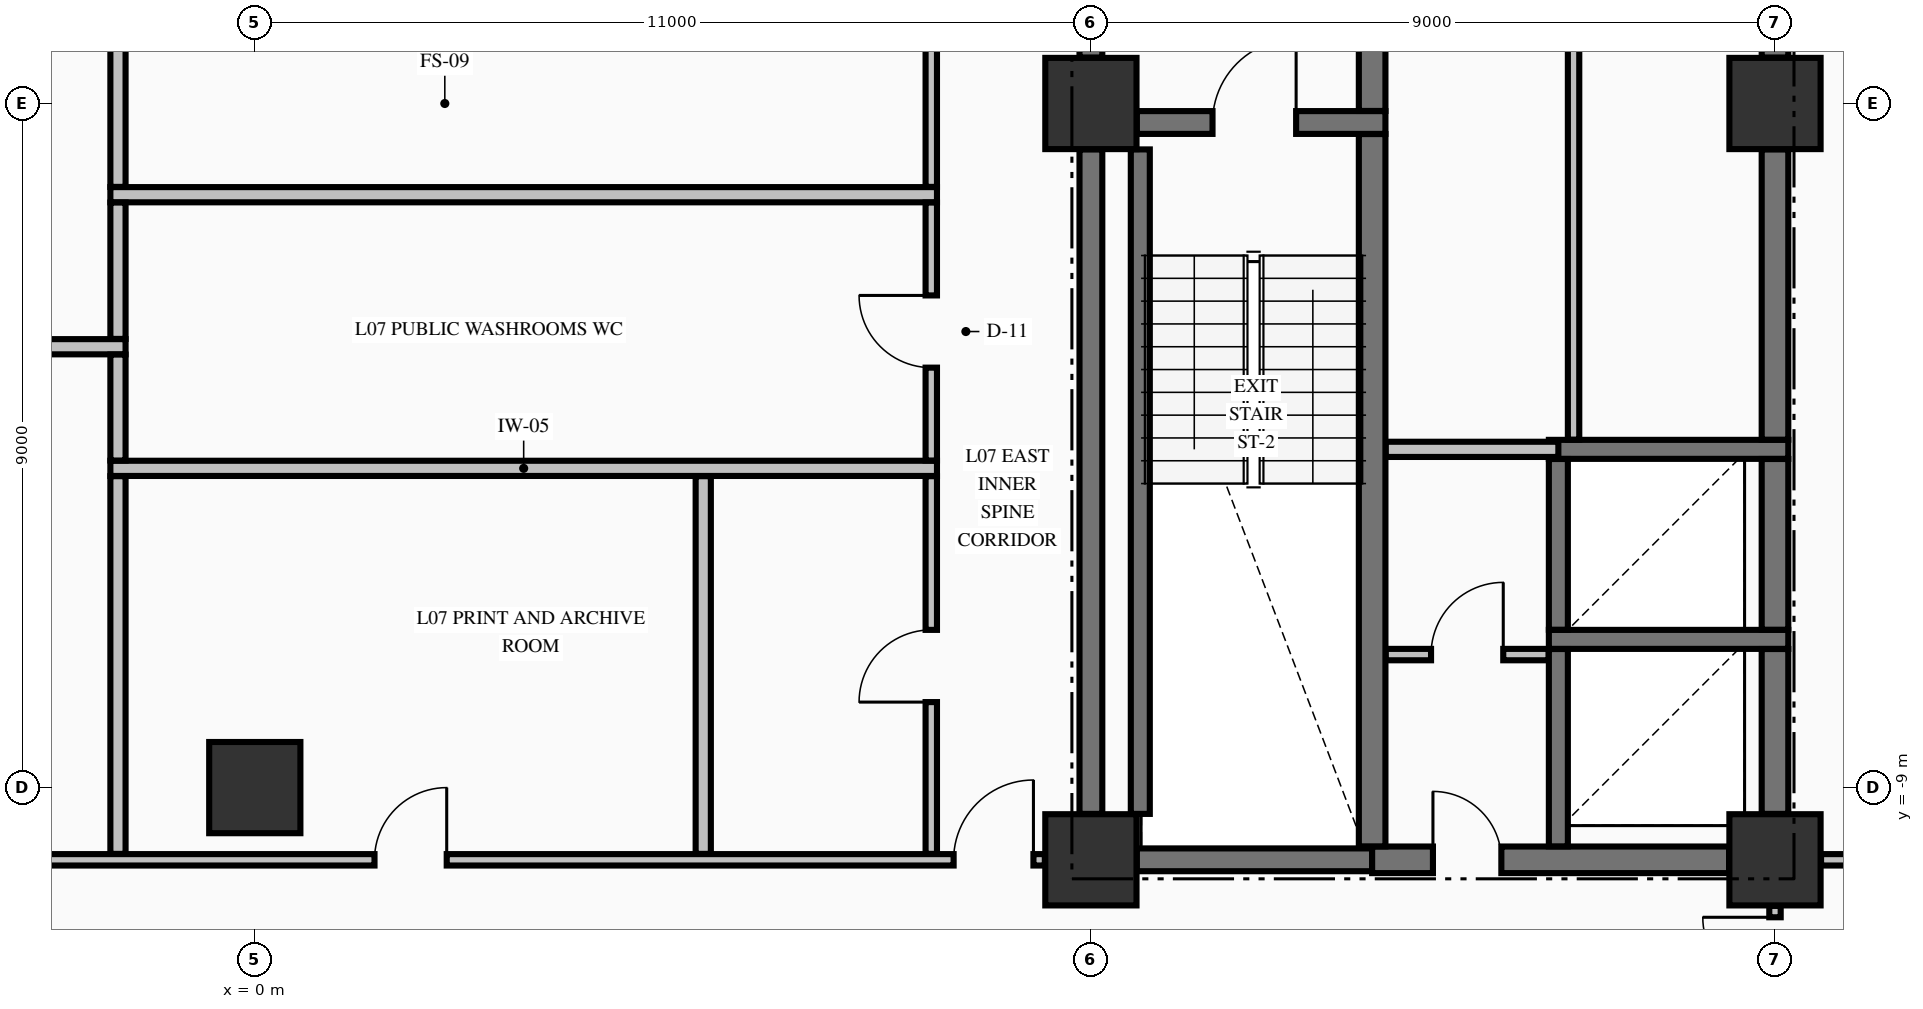
"""IFC4 building model, lengths in metres.
Left out: names, types, materials, properties, quantities, classifications, styles, units other than length and angle.
Written with IfcOpenShell. Run it as: python <this file> out.ifc"""

import sys

from ifc_helpers import new_model, si_unit, direction, frame, frame_2d, origin, origin_2d, place, context, subcontext, project, spatial, rectangle, extrude, element, fill, save


model = new_model("IFC4")
c1 = context("Model", 3, precision=1e-05, world=origin(), true_north=direction((0.0, 1.0)))
c2 = subcontext(c1, "Body", "Model", "MODEL_VIEW")
j1 = project(units=[si_unit("LENGTHUNIT", "METRE"), si_unit("PLANEANGLEUNIT", "RADIAN")], contexts=[c1])
p1 = place(None, origin())
s1 = spatial("IfcSite", under=j1, at=p1, CompositionType="ELEMENT")
p2 = place(p1, origin())
s2 = spatial("IfcBuilding", under=s1, at=p2, CompositionType="ELEMENT")
p3 = place(p2, frame((0.0, 0.0, 34.34)))
s3 = spatial("IfcBuildingStorey", under=s2, at=p3, CompositionType="ELEMENT", Elevation=34.34)
for number, where, z_axis, x_axis in (
    (1, (11.0, -9.95, -0.3), (0.0, 0.0, 1.0), (1.0, 0.0, 0.0)),
    (2, (11.0, 0.0, -0.3), (0.0, 0.0, 1.0), (1.0, 0.0, 0.0)),
    (3, (20.0, -9.95, -0.3), (0.0, 0.0, 1.0), (1.0, 0.0, 0.0)),
    (4, (0.0, -9.0, -0.3), (0.0, 0.0, 1.0), (1.0, 0.0, 0.0)),
    (5, (20.0, 0.0, -0.3), (0.0, 0.0, 1.0), (1.0, 0.0, 0.0)),
):
    element("IfcColumn", number, at=place(p3, frame(where, z_axis=z_axis, x_axis=x_axis)), inside=s3, PredefinedType="COLUMN", context=c2, shape_type="SweptSolid", body=[
        extrude(rectangle(XDim=1.2, YDim=1.2, at=origin_2d()), origin(), (0.0, 0.0, 1.0), 3.62),
    ])
p4 = place(p3, frame((11.604, -9.95, 0.0), z_axis=(0.0, 0.0, 1.0), x_axis=(1.0, 0.0, 0.0)))
e6 = element("IfcWall", 6, at=p4, inside=s3, PredefinedType="SHEAR", context=c2, shape_type="SweptSolid", body=[
    extrude(rectangle(XDim=3.096, YDim=0.3, at=frame_2d((1.548, 0.0))), origin(), (0.0, 0.0, 1.0), 3.32),
])
p5 = place(p3, frame((14.7, -9.95, 0.0), z_axis=(0.0, 0.0, 1.0), x_axis=(1.0, 0.0, 0.0)))
e7 = element("IfcWall", 7, at=p5, inside=s3, PredefinedType="SHEAR", context=c2, shape_type="SweptSolid", body=[
    extrude(rectangle(XDim=4.696, YDim=0.35, at=frame_2d((2.348, 0.0))), origin(), (0.0, 0.0, 1.0), 3.32),
])
p6 = place(p5, frame((0.8, 0.0, 0.0)))
e8 = element("IfcOpeningElement", 8, at=p6, cuts=e7, PredefinedType="OPENING", context=c2, shape_type="SweptSolid", body=[
    extrude(rectangle(XDim=0.9, YDim=2.15, at=frame_2d((0.45, 1.075))), frame((0.0, 0.185, 0.0), z_axis=(0.0, -1.0, 0.0), x_axis=(1.0, 0.0, 0.0)), (0.0, 0.0, 1.0), 0.37),
])
for number, where, z_axis, x_axis in (
    (9, (17.025, -7.05, 0.0), (0.0, 0.0, 1.0), (1.0, 0.0, 0.0)),
    (10, (17.025, -4.55, 0.0), (0.0, 0.0, 1.0), (1.0, 0.0, 0.0)),
):
    element("IfcWall", number, at=place(p3, frame(where, z_axis=z_axis, x_axis=x_axis)), inside=s3, PredefinedType="SOLIDWALL", context=c2, shape_type="SweptSolid", body=[
        extrude(rectangle(XDim=3.15, YDim=0.25, at=frame_2d((1.575, 0.0))), origin(), (0.0, 0.0, 1.0), 3.32),
    ])
p7 = place(p3, frame((11.604, -0.25, 0.0), z_axis=(0.0, 0.0, 1.0), x_axis=(1.0, 0.0, 0.0)))
e11 = element("IfcWall", 11, at=p7, inside=s3, PredefinedType="SHEAR", context=c2, shape_type="SweptSolid", body=[
    extrude(rectangle(XDim=3.271, YDim=0.3, at=frame_2d((1.635, 0.0))), origin(), (0.0, 0.0, 1.0), 3.32),
])
p8 = place(p7, frame((0.996, 0.0, 0.0)))
e12 = element("IfcOpeningElement", 12, at=p8, cuts=e11, PredefinedType="OPENING", context=c2, shape_type="SweptSolid", body=[
    extrude(rectangle(XDim=1.1, YDim=2.15, at=frame_2d((0.55, 1.075))), frame((0.0, 0.16, 0.0), z_axis=(0.0, -1.0, 0.0), x_axis=(1.0, 0.0, 0.0)), (0.0, 0.0, 1.0), 0.32),
])
p9 = place(p3, frame((-10.394, -9.95, 0.0), z_axis=(0.0, 0.0, 1.0), x_axis=(1.0, 0.0, 0.0)))
e13 = element("IfcWall", 13, at=p9, inside=s3, PredefinedType="PARTITIONING", context=c2, shape_type="SweptSolid", body=[
    extrude(rectangle(XDim=20.788, YDim=0.15, at=frame_2d((10.394, 0.0))), origin(), (0.0, 0.0, 1.0), 3.32),
])
p10 = place(p9, frame((0.15, 0.0, 0.0)))
e14 = element("IfcOpeningElement", 14, at=p10, cuts=e13, PredefinedType="OPENING", context=c2, shape_type="SweptSolid", body=[
    extrude(rectangle(XDim=1.05, YDim=2.15, at=frame_2d((0.525, 1.075))), frame((0.0, 0.085, 0.0), z_axis=(0.0, -1.0, 0.0), x_axis=(1.0, 0.0, 0.0)), (0.0, 0.0, 1.0), 0.17),
])
p11 = place(p9, frame((19.588, 0.0, 0.0)))
e15 = element("IfcOpeningElement", 15, at=p11, cuts=e13, PredefinedType="OPENING", context=c2, shape_type="SweptSolid", body=[
    extrude(rectangle(XDim=1.05, YDim=2.15, at=frame_2d((0.525, 1.075))), frame((0.0, 0.085, 0.0), z_axis=(0.0, -1.0, 0.0), x_axis=(1.0, 0.0, 0.0)), (0.0, 0.0, 1.0), 0.17),
])
p12 = place(p9, frame((11.969, 0.0, 0.0)))
e16 = element("IfcOpeningElement", 16, at=p12, cuts=e13, PredefinedType="OPENING", context=c2, shape_type="SweptSolid", body=[
    extrude(rectangle(XDim=0.95, YDim=2.15, at=frame_2d((0.475, 1.075))), frame((0.0, 0.085, 0.0), z_axis=(0.0, -1.0, 0.0), x_axis=(1.0, 0.0, 0.0)), (0.0, 0.0, 1.0), 0.17),
])
p13 = place(p3, frame((20.606, -9.95, 0.0), z_axis=(0.0, 0.0, 1.0), x_axis=(1.0, 0.0, 0.0)))
e17 = element("IfcWall", 17, at=p13, inside=s3, PredefinedType="PARTITIONING", context=c2, shape_type="SweptSolid", body=[
    extrude(rectangle(XDim=8.229, YDim=0.15, at=frame_2d((4.115, 0.0))), origin(), (0.0, 0.0, 1.0), 3.32),
])
p14 = place(p13, frame((3.394, 0.0, 0.0)))
e18 = element("IfcOpeningElement", 18, at=p14, cuts=e17, PredefinedType="OPENING", context=c2, shape_type="SweptSolid", body=[
    extrude(rectangle(XDim=1.0, YDim=2.15, at=frame_2d((0.5, 1.075))), frame((0.0, 0.085, 0.0), z_axis=(0.0, -1.0, 0.0), x_axis=(1.0, 0.0, 0.0)), (0.0, 0.0, 1.0), 0.17),
])
p15 = place(p3, frame((14.878, -7.25, 0.0), z_axis=(0.0, 0.0, 1.0), x_axis=(1.0, 0.0, 0.0)))
e19 = element("IfcWall", 19, at=p15, inside=s3, PredefinedType="PARTITIONING", context=c2, shape_type="SweptSolid", body=[
    extrude(rectangle(XDim=2.144, YDim=0.15, at=frame_2d((1.072, 0.0))), origin(), (0.0, 0.0, 1.0), 3.32),
])
p16 = place(p15, frame((0.597, 0.0, 0.0)))
e20 = element("IfcOpeningElement", 20, at=p16, cuts=e19, PredefinedType="OPENING", context=c2, shape_type="SweptSolid", body=[
    extrude(rectangle(XDim=0.95, YDim=2.15, at=frame_2d((0.475, 1.075))), frame((0.0, 0.085, 0.0), z_axis=(0.0, -1.0, 0.0), x_axis=(1.0, 0.0, 0.0)), (0.0, 0.0, 1.0), 0.17),
])
p17 = place(p3, frame((-1.9, -4.8, 0.0), z_axis=(0.0, 0.0, 1.0), x_axis=(1.0, 0.0, 0.0)))
e21 = element("IfcWall", 21, at=p17, inside=s3, PredefinedType="PARTITIONING", context=c2, shape_type="SweptSolid", body=[
    extrude(rectangle(XDim=10.875, YDim=0.2, at=frame_2d((5.438, 0.0))), origin(), (0.0, 0.0, 1.0), 3.32),
])
p18 = place(p3, frame((14.878, -4.55, 0.0), z_axis=(0.0, 0.0, 1.0), x_axis=(1.0, 0.0, 0.0)))
e22 = element("IfcWall", 22, at=p18, inside=s3, PredefinedType="PARTITIONING", context=c2, shape_type="SweptSolid", body=[
    extrude(rectangle(XDim=2.272, YDim=0.2, at=frame_2d((1.136, 0.0))), origin(), (0.0, 0.0, 1.0), 3.32),
])
p19 = place(p3, frame((-8.975, -3.2, 0.0), z_axis=(0.0, 0.0, 1.0), x_axis=(1.0, 0.0, 0.0)))
e23 = element("IfcWall", 23, at=p19, inside=s3, PredefinedType="PARTITIONING", context=c2, shape_type="SweptSolid", body=[
    extrude(rectangle(XDim=7.275, YDim=0.2, at=frame_2d((3.638, 0.0))), origin(), (0.0, 0.0, 1.0), 3.32),
])
p20 = place(p3, frame((-1.9, -1.2, 0.0), z_axis=(0.0, 0.0, 1.0), x_axis=(1.0, 0.0, 0.0)))
e24 = element("IfcWall", 24, at=p20, inside=s3, PredefinedType="PARTITIONING", context=c2, shape_type="SweptSolid", body=[
    extrude(rectangle(XDim=10.875, YDim=0.2, at=frame_2d((5.438, 0.0))), origin(), (0.0, 0.0, 1.0), 3.32),
])
p21 = place(p3, frame((11.0, -9.346, 0.0), z_axis=(0.0, 0.0, 1.0), x_axis=(0.0, 1.0, 0.0)))
e25 = element("IfcWall", 25, at=p21, inside=s3, PredefinedType="SHEAR", context=c2, shape_type="SweptSolid", body=[
    extrude(rectangle(XDim=8.742, YDim=0.3, at=frame_2d((4.371, 0.0))), origin(), (0.0, 0.0, 1.0), 3.32),
])
p22 = place(p3, frame((11.0, 0.604, 0.0), z_axis=(0.0, 0.0, 1.0), x_axis=(0.0, 1.0, 0.0)))
e26 = element("IfcWall", 26, at=p22, inside=s3, PredefinedType="SHEAR", context=c2, shape_type="SweptSolid", body=[
    extrude(rectangle(XDim=2.144, YDim=0.3, at=frame_2d((1.072, 0.0))), origin(), (0.0, 0.0, 1.0), 3.32),
])
p23 = place(p22, frame((0.496, 0.0, 0.0)))
e27 = element("IfcOpeningElement", 27, at=p23, cuts=e26, PredefinedType="OPENING", context=c2, shape_type="SweptSolid", body=[
    extrude(rectangle(XDim=1.1, YDim=2.15, at=frame_2d((0.55, 1.075))), frame((0.0, 0.16, 0.0), z_axis=(0.0, -1.0, 0.0), x_axis=(1.0, 0.0, 0.0)), (0.0, 0.0, 1.0), 0.32),
])
p24 = place(p3, frame((11.65, -9.346, 0.0), z_axis=(0.0, 0.0, 1.0), x_axis=(0.0, 1.0, 0.0)))
e28 = element("IfcWall", 28, at=p24, inside=s3, PredefinedType="SOLIDWALL", context=c2, shape_type="SweptSolid", body=[
    extrude(rectangle(XDim=8.742, YDim=0.25, at=frame_2d((4.371, 0.0))), origin(), (0.0, 0.0, 1.0), 3.32),
])
p25 = place(p3, frame((14.7, -9.773, 0.0), z_axis=(0.0, 0.0, 1.0), x_axis=(0.0, 1.0, 0.0)))
e29 = element("IfcWall", 29, at=p25, inside=s3, PredefinedType="SHEAR", context=c2, shape_type="SweptSolid", body=[
    extrude(rectangle(XDim=9.371, YDim=0.35, at=frame_2d((4.686, 0.0))), origin(), (0.0, 0.0, 1.0), 3.32),
])
p26 = place(p3, frame((14.7, -0.098, 0.0), z_axis=(0.0, 0.0, 1.0), x_axis=(0.0, 1.0, 0.0)))
e30 = element("IfcWall", 30, at=p26, inside=s3, PredefinedType="SHEAR", context=c2, shape_type="SweptSolid", body=[
    extrude(rectangle(XDim=2.846, YDim=0.35, at=frame_2d((1.423, 0.0))), origin(), (0.0, 0.0, 1.0), 3.32),
])
p27 = place(p3, frame((17.15, -9.773, 0.0), z_axis=(0.0, 0.0, 1.0), x_axis=(0.0, 1.0, 0.0)))
e31 = element("IfcWall", 31, at=p27, inside=s3, PredefinedType="SOLIDWALL", context=c2, shape_type="SweptSolid", body=[
    extrude(rectangle(XDim=2.596, YDim=0.25, at=frame_2d((1.298, 0.0))), origin(), (0.0, 0.0, 1.0), 3.32),
])
p28 = place(p3, frame((17.15, -6.923, 0.0), z_axis=(0.0, 0.0, 1.0), x_axis=(0.0, 1.0, 0.0)))
e32 = element("IfcWall", 32, at=p28, inside=s3, PredefinedType="SOLIDWALL", context=c2, shape_type="SweptSolid", body=[
    extrude(rectangle(XDim=2.246, YDim=0.25, at=frame_2d((1.123, 0.0))), origin(), (0.0, 0.0, 1.0), 3.32),
])
p29 = place(p3, frame((20.0, -9.346, 0.0), z_axis=(0.0, 0.0, 1.0), x_axis=(0.0, 1.0, 0.0)))
e33 = element("IfcWall", 33, at=p29, inside=s3, PredefinedType="SHEAR", context=c2, shape_type="SweptSolid", body=[
    extrude(rectangle(XDim=2.169, YDim=0.35, at=frame_2d((1.084, 0.0))), origin(), (0.0, 0.0, 1.0), 3.32),
])
p30 = place(p3, frame((20.0, -6.923, 0.0), z_axis=(0.0, 0.0, 1.0), x_axis=(0.0, 1.0, 0.0)))
e34 = element("IfcWall", 34, at=p30, inside=s3, PredefinedType="SHEAR", context=c2, shape_type="SweptSolid", body=[
    extrude(rectangle(XDim=2.246, YDim=0.35, at=frame_2d((1.123, 0.0))), origin(), (0.0, 0.0, 1.0), 3.32),
])
p31 = place(p3, frame((20.0, -4.423, 0.0), z_axis=(0.0, 0.0, 1.0), x_axis=(0.0, 1.0, 0.0)))
e35 = element("IfcWall", 35, at=p31, inside=s3, PredefinedType="SHEAR", context=c2, shape_type="SweptSolid", body=[
    extrude(rectangle(XDim=3.819, YDim=0.35, at=frame_2d((1.91, 0.0))), origin(), (0.0, 0.0, 1.0), 3.32),
])
p32 = place(p3, frame((20.0, 0.604, 0.0), z_axis=(0.0, 0.0, 1.0), x_axis=(0.0, 1.0, 0.0)))
e36 = element("IfcWall", 36, at=p32, inside=s3, PredefinedType="SHEAR", context=c2, shape_type="SweptSolid", body=[
    extrude(rectangle(XDim=9.292, YDim=0.35, at=frame_2d((4.646, 0.0))), origin(), (0.0, 0.0, 1.0), 3.32),
])
p33 = place(p3, frame((-1.8, -9.872, 0.0), z_axis=(0.0, 0.0, 1.0), x_axis=(0.0, 1.0, 0.0)))
e37 = element("IfcWall", 37, at=p33, inside=s3, PredefinedType="PARTITIONING", context=c2, shape_type="SweptSolid", body=[
    extrude(rectangle(XDim=4.969, YDim=0.2, at=frame_2d((2.484, 0.0))), origin(), (0.0, 0.0, 1.0), 3.32),
])
p34 = place(p3, frame((-1.8, -4.697, 0.0), z_axis=(0.0, 0.0, 1.0), x_axis=(0.0, 1.0, 0.0)))
e38 = element("IfcWall", 38, at=p34, inside=s3, PredefinedType="PARTITIONING", context=c2, shape_type="SweptSolid", body=[
    extrude(rectangle(XDim=1.394, YDim=0.2, at=frame_2d((0.697, 0.0))), origin(), (0.0, 0.0, 1.0), 3.32),
])
p35 = place(p3, frame((-1.8, -3.097, 0.0), z_axis=(0.0, 0.0, 1.0), x_axis=(0.0, 1.0, 0.0)))
e39 = element("IfcWall", 39, at=p35, inside=s3, PredefinedType="PARTITIONING", context=c2, shape_type="SweptSolid", body=[
    extrude(rectangle(XDim=1.794, YDim=0.2, at=frame_2d((0.897, 0.0))), origin(), (0.0, 0.0, 1.0), 3.32),
])
p36 = place(p3, frame((-1.8, -1.097, 0.0), z_axis=(0.0, 0.0, 1.0), x_axis=(0.0, 1.0, 0.0)))
e40 = element("IfcWall", 40, at=p36, inside=s3, PredefinedType="PARTITIONING", context=c2, shape_type="SweptSolid", body=[
    extrude(rectangle(XDim=11.519, YDim=0.2, at=frame_2d((5.76, 0.0))), origin(), (0.0, 0.0, 1.0), 3.32),
])
p37 = place(p3, frame((5.9, -9.872, 0.0), z_axis=(0.0, 0.0, 1.0), x_axis=(0.0, 1.0, 0.0)))
e41 = element("IfcWall", 41, at=p37, inside=s3, PredefinedType="PARTITIONING", context=c2, shape_type="SweptSolid", body=[
    extrude(rectangle(XDim=4.969, YDim=0.2, at=frame_2d((2.484, 0.0))), origin(), (0.0, 0.0, 1.0), 3.32),
])
p38 = place(p3, frame((8.9, -9.872, 0.0), z_axis=(0.0, 0.0, 1.0), x_axis=(0.0, 1.0, 0.0)))
e42 = element("IfcWall", 42, at=p38, inside=s3, PredefinedType="PARTITIONING", context=c2, shape_type="SweptSolid", body=[
    extrude(rectangle(XDim=4.969, YDim=0.15, at=frame_2d((2.484, 0.0))), origin(), (0.0, 0.0, 1.0), 3.32),
])
p39 = place(p38, frame((1.997, 0.0, 0.0)))
e43 = element("IfcOpeningElement", 43, at=p39, cuts=e42, PredefinedType="OPENING", context=c2, shape_type="SweptSolid", body=[
    extrude(rectangle(XDim=0.95, YDim=2.15, at=frame_2d((0.475, 1.075))), frame((0.0, 0.085, 0.0), z_axis=(0.0, -1.0, 0.0), x_axis=(1.0, 0.0, 0.0)), (0.0, 0.0, 1.0), 0.17),
])
p40 = place(p3, frame((8.9, -4.697, 0.0), z_axis=(0.0, 0.0, 1.0), x_axis=(0.0, 1.0, 0.0)))
e44 = element("IfcWall", 44, at=p40, inside=s3, PredefinedType="PARTITIONING", context=c2, shape_type="SweptSolid", body=[
    extrude(rectangle(XDim=3.394, YDim=0.15, at=frame_2d((1.697, 0.0))), origin(), (0.0, 0.0, 1.0), 3.32),
])
p41 = place(p40, frame((1.222, 0.0, 0.0)))
e45 = element("IfcOpeningElement", 45, at=p41, cuts=e44, PredefinedType="OPENING", context=c2, shape_type="SweptSolid", body=[
    extrude(rectangle(XDim=0.95, YDim=2.15, at=frame_2d((0.475, 1.075))), frame((0.0, 0.085, 0.0), z_axis=(0.0, -1.0, 0.0), x_axis=(1.0, 0.0, 0.0)), (0.0, 0.0, 1.0), 0.17),
])
p42 = place(p3, frame((8.9, -1.097, 0.0), z_axis=(0.0, 0.0, 1.0), x_axis=(0.0, 1.0, 0.0)))
e46 = element("IfcWall", 46, at=p42, inside=s3, PredefinedType="PARTITIONING", context=c2, shape_type="SweptSolid", body=[
    extrude(rectangle(XDim=11.519, YDim=0.15, at=frame_2d((5.76, 0.0))), origin(), (0.0, 0.0, 1.0), 3.32),
])
p43 = place(p42, frame((5.197, 0.0, 0.0)))
e47 = element("IfcOpeningElement", 47, at=p43, cuts=e46, PredefinedType="OPENING", context=c2, shape_type="SweptSolid", body=[
    extrude(rectangle(XDim=1.1, YDim=2.15, at=frame_2d((0.55, 1.075))), frame((0.0, 0.085, 0.0), z_axis=(0.0, -1.0, 0.0), x_axis=(1.0, 0.0, 0.0)), (0.0, 0.0, 1.0), 0.17),
])
p44 = place(p3, frame((17.35, -4.422, 0.0), z_axis=(0.0, 0.0, 1.0), x_axis=(0.0, 1.0, 0.0)))
e48 = element("IfcWall", 48, at=p44, inside=s3, PredefinedType="PARTITIONING", context=c2, shape_type="SweptSolid", body=[
    extrude(rectangle(XDim=14.744, YDim=0.15, at=frame_2d((7.372, 0.0))), origin(), (0.0, 0.0, 1.0), 3.32),
])
p45 = place(p3, frame((20.0, -12.122, 0.0), z_axis=(0.0, 0.0, 1.0), x_axis=(0.0, 1.0, 0.0)))
e49 = element("IfcWall", 49, at=p45, inside=s3, PredefinedType="PARTITIONING", context=c2, shape_type="SweptSolid", body=[
    extrude(rectangle(XDim=1.566, YDim=0.15, at=frame_2d((0.783, 0.0))), origin(), (0.0, 0.0, 1.0), 2.66),
])
p46 = place(p45, frame((0.466, 0.0, 0.0)))
e50 = element("IfcOpeningElement", 50, at=p46, cuts=e49, PredefinedType="OPENING", context=c2, shape_type="SweptSolid", body=[
    extrude(rectangle(XDim=0.95, YDim=2.15, at=frame_2d((0.475, 1.075))), frame((0.0, 0.085, 0.0), z_axis=(0.0, -1.0, 0.0), x_axis=(1.0, 0.0, 0.0)), (0.0, 0.0, 1.0), 0.17),
])
p47 = place(p8, origin())
e51 = element("IfcDoor", 51, at=p47, inside=s3, OperationType="SINGLE_SWING_RIGHT", PredefinedType="DOOR", context=c2, shape_type="SweptSolid", body=[
    extrude(rectangle(XDim=1.1, YDim=2.15, at=frame_2d((0.55, 1.075))), frame((0.0, 0.025, 0.0), z_axis=(0.0, -1.0, 0.0), x_axis=(1.0, 0.0, 0.0)), (0.0, 0.0, 1.0), 0.05),
])
fill(e12, e51)
p48 = place(p6, origin())
e52 = element("IfcDoor", 52, at=p48, inside=s3, OperationType="SINGLE_SWING_LEFT", PredefinedType="DOOR", context=c2, shape_type="SweptSolid", body=[
    extrude(rectangle(XDim=0.9, YDim=2.15, at=frame_2d((0.45, 1.075))), frame((0.0, 0.025, 0.0), z_axis=(0.0, -1.0, 0.0), x_axis=(1.0, 0.0, 0.0)), (0.0, 0.0, 1.0), 0.05),
])
fill(e8, e52)
p49 = place(p16, origin())
e53 = element("IfcDoor", 53, at=p49, inside=s3, OperationType="SINGLE_SWING_RIGHT", PredefinedType="DOOR", context=c2, shape_type="SweptSolid", body=[
    extrude(rectangle(XDim=0.95, YDim=2.15, at=frame_2d((0.475, 1.075))), frame((0.0, 0.025, 0.0), z_axis=(0.0, -1.0, 0.0), x_axis=(1.0, 0.0, 0.0)), (0.0, 0.0, 1.0), 0.05),
])
fill(e20, e53)
p50 = place(p11, origin())
e54 = element("IfcDoor", 54, at=p50, inside=s3, OperationType="SINGLE_SWING_RIGHT", PredefinedType="DOOR", context=c2, shape_type="SweptSolid", body=[
    extrude(rectangle(XDim=1.05, YDim=2.15, at=frame_2d((0.525, 1.075))), frame((0.0, 0.025, 0.0), z_axis=(0.0, -1.0, 0.0), x_axis=(1.0, 0.0, 0.0)), (0.0, 0.0, 1.0), 0.05),
])
fill(e15, e54)
p51 = place(p41, origin())
e55 = element("IfcDoor", 55, at=p51, inside=s3, OperationType="SINGLE_SWING_RIGHT", PredefinedType="DOOR", context=c2, shape_type="SweptSolid", body=[
    extrude(rectangle(XDim=0.95, YDim=2.15, at=frame_2d((0.475, 1.075))), frame((0.0, 0.025, 0.0), z_axis=(0.0, -1.0, 0.0), x_axis=(1.0, 0.0, 0.0)), (0.0, 0.0, 1.0), 0.05),
])
fill(e45, e55)
p52 = place(p39, origin())
e56 = element("IfcDoor", 56, at=p52, inside=s3, OperationType="SINGLE_SWING_LEFT", PredefinedType="DOOR", context=c2, shape_type="SweptSolid", body=[
    extrude(rectangle(XDim=0.95, YDim=2.15, at=frame_2d((0.475, 1.075))), frame((0.0, 0.025, 0.0), z_axis=(0.0, -1.0, 0.0), x_axis=(1.0, 0.0, 0.0)), (0.0, 0.0, 1.0), 0.05),
])
fill(e43, e56)
p53 = place(p12, origin())
e57 = element("IfcDoor", 57, at=p53, inside=s3, OperationType="SINGLE_SWING_RIGHT", PredefinedType="DOOR", context=c2, shape_type="SweptSolid", body=[
    extrude(rectangle(XDim=0.95, YDim=2.15, at=frame_2d((0.475, 1.075))), frame((0.0, 0.025, 0.0), z_axis=(0.0, -1.0, 0.0), x_axis=(1.0, 0.0, 0.0)), (0.0, 0.0, 1.0), 0.05),
])
fill(e16, e57)
p54 = place(p46, origin())
e58 = element("IfcDoor", 58, at=p54, inside=s3, OperationType="SINGLE_SWING_RIGHT", PredefinedType="DOOR", context=c2, shape_type="SweptSolid", body=[
    extrude(rectangle(XDim=0.95, YDim=2.15, at=frame_2d((0.475, 1.075))), frame((0.0, 0.025, 0.0), z_axis=(0.0, -1.0, 0.0), x_axis=(1.0, 0.0, 0.0)), (0.0, 0.0, 1.0), 0.05),
])
fill(e50, e58)
save(model, sys.argv[1])
